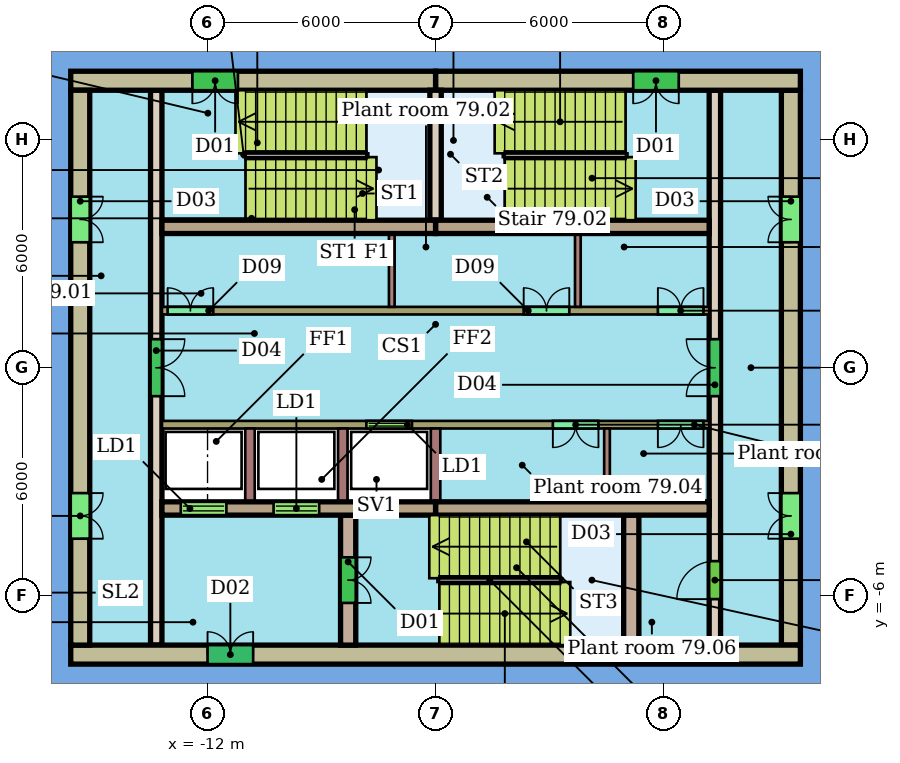
"""IFC4 building model, lengths in metres.
Left out: names, types, materials, properties, quantities, classifications, styles, units other than length and angle.
Written with IfcOpenShell. Run it as: python <this file> out.ifc"""

import sys

from ifc_helpers import new_model, si_unit, direction, frame, frame_2d, origin, place, context, subcontext, project, spatial, rectangle, extrude, element, fill, save


model = new_model("IFC4")
c1 = context("Model", 3, precision=1e-05, world=origin(), true_north=direction((0.0, 1.0)))
c2 = subcontext(c1, "Body", "Model", "MODEL_VIEW")
j1 = project(units=[si_unit("LENGTHUNIT", "METRE"), si_unit("PLANEANGLEUNIT", "RADIAN")], contexts=[c1])
p1 = place(None, origin())
s1 = spatial("IfcSite", under=j1, at=p1, CompositionType="ELEMENT")
p2 = place(p1, origin())
s2 = spatial("IfcBuilding", under=s1, at=p2, CompositionType="ELEMENT")
p3 = place(p2, frame((0.0, 0.0, 317.1)))
s3 = spatial("IfcBuildingStorey", under=s2, at=p3, CompositionType="ELEMENT", Elevation=317.1)
p4 = place(p3, frame((3.6, 7.55, 0.0), z_axis=(0.0, 0.0, 1.0), x_axis=(-1.0, 0.0, 0.0)))
e1 = element("IfcWall", 1, at=p4, inside=s3, PredefinedType="SHEAR", context=c2, shape_type="SweptSolid", body=[
    extrude(rectangle(XDim=9.6, YDim=0.5, at=frame_2d((4.8, 0.0))), origin(), (0.0, 0.0, 1.0), 3.9),
])
p5 = place(p4, frame((3.2, 0.0, 0.0)))
e2 = element("IfcOpeningElement", 2, at=p5, cuts=e1, PredefinedType="OPENING", context=c2, shape_type="SweptSolid", body=[
    extrude(rectangle(XDim=1.2, YDim=2.1, at=frame_2d((0.6, 1.05))), frame((0.0, 0.26, 0.0), z_axis=(0.0, -1.0, 0.0), x_axis=(1.0, 0.0, 0.0)), (0.0, 0.0, 1.0), 0.52),
])
p6 = place(p3, frame((-6.0, 7.55, 0.0), z_axis=(0.0, 0.0, 1.0), x_axis=(-1.0, 0.0, 0.0)))
e3 = element("IfcWall", 3, at=p6, inside=s3, PredefinedType="SHEAR", context=c2, shape_type="SweptSolid", body=[
    extrude(rectangle(XDim=9.6, YDim=0.5, at=frame_2d((4.8, 0.0))), origin(), (0.0, 0.0, 1.0), 3.9),
])
p7 = place(p6, frame((5.2, 0.0, 0.0)))
e4 = element("IfcOpeningElement", 4, at=p7, cuts=e3, PredefinedType="OPENING", context=c2, shape_type="SweptSolid", body=[
    extrude(rectangle(XDim=1.2, YDim=2.1, at=frame_2d((0.6, 1.05))), frame((0.0, 0.26, 0.0), z_axis=(0.0, -1.0, 0.0), x_axis=(1.0, 0.0, 0.0)), (0.0, 0.0, 1.0), 0.52),
])
p8 = place(p3, frame((-15.6, -7.55, 0.0), z_axis=(0.0, 0.0, 1.0), x_axis=(1.0, 0.0, 0.0)))
e5 = element("IfcWall", 5, at=p8, inside=s3, PredefinedType="SHEAR", context=c2, shape_type="SweptSolid", body=[
    extrude(rectangle(XDim=19.2, YDim=0.5, at=frame_2d((9.6, 0.0))), origin(), (0.0, 0.0, 1.0), 3.9),
])
p9 = place(p8, frame((3.6, 0.0, 0.0)))
e6 = element("IfcOpeningElement", 6, at=p9, cuts=e5, PredefinedType="OPENING", context=c2, shape_type="SweptSolid", body=[
    extrude(rectangle(XDim=1.2, YDim=2.1, at=frame_2d((0.6, 1.05))), frame((0.0, 0.26, 0.0), z_axis=(0.0, -1.0, 0.0), x_axis=(1.0, 0.0, 0.0)), (0.0, 0.0, 1.0), 0.52),
])
p10 = place(p3, frame((-15.35, 7.3, 0.0), z_axis=(0.0, 0.0, 1.0), x_axis=(0.0, -1.0, 0.0)))
e7 = element("IfcWall", 7, at=p10, inside=s3, PredefinedType="SHEAR", context=c2, shape_type="SweptSolid", body=[
    extrude(rectangle(XDim=14.6, YDim=0.5, at=frame_2d((7.3, 0.0))), origin(), (0.0, 0.0, 1.0), 3.9),
])
p11 = place(p10, frame((10.6, 0.0, 0.0)))
e8 = element("IfcOpeningElement", 8, at=p11, cuts=e7, PredefinedType="OPENING", context=c2, shape_type="SweptSolid", body=[
    extrude(rectangle(XDim=1.2, YDim=2.1, at=frame_2d((0.6, 1.05))), frame((0.0, 0.26, 0.0), z_axis=(0.0, -1.0, 0.0), x_axis=(1.0, 0.0, 0.0)), (0.0, 0.0, 1.0), 0.52),
])
p12 = place(p10, frame((2.8, 0.0, 0.0)))
e9 = element("IfcOpeningElement", 9, at=p12, cuts=e7, PredefinedType="OPENING", context=c2, shape_type="SweptSolid", body=[
    extrude(rectangle(XDim=1.2, YDim=2.1, at=frame_2d((0.6, 1.05))), frame((0.0, 0.26, 0.0), z_axis=(0.0, -1.0, 0.0), x_axis=(1.0, 0.0, 0.0)), (0.0, 0.0, 1.0), 0.52),
])
p13 = place(p3, frame((3.35, -7.3, 0.0), z_axis=(0.0, 0.0, 1.0), x_axis=(0.0, 1.0, 0.0)))
e10 = element("IfcWall", 10, at=p13, inside=s3, PredefinedType="SHEAR", context=c2, shape_type="SweptSolid", body=[
    extrude(rectangle(XDim=14.6, YDim=0.5, at=frame_2d((7.3, 0.0))), origin(), (0.0, 0.0, 1.0), 3.9),
])
p14 = place(p13, frame((2.8, 0.0, 0.0)))
e11 = element("IfcOpeningElement", 11, at=p14, cuts=e10, PredefinedType="OPENING", context=c2, shape_type="SweptSolid", body=[
    extrude(rectangle(XDim=1.2, YDim=2.1, at=frame_2d((0.6, 1.05))), frame((0.0, 0.26, 0.0), z_axis=(0.0, -1.0, 0.0), x_axis=(1.0, 0.0, 0.0)), (0.0, 0.0, 1.0), 0.52),
])
p15 = place(p13, frame((10.6, 0.0, 0.0)))
e12 = element("IfcOpeningElement", 12, at=p15, cuts=e10, PredefinedType="OPENING", context=c2, shape_type="SweptSolid", body=[
    extrude(rectangle(XDim=1.2, YDim=2.1, at=frame_2d((0.6, 1.05))), frame((0.0, 0.26, 0.0), z_axis=(0.0, -1.0, 0.0), x_axis=(1.0, 0.0, 0.0)), (0.0, 0.0, 1.0), 0.52),
])
for number, where, z_axis, x_axis in (
    (13, (-13.2, 3.705, 0.0), (0.0, 0.0, 1.0), (1.0, 0.0, 0.0)),
    (14, (-6.0, 3.705, 0.0), (0.0, 0.0, 1.0), (1.0, 0.0, 0.0)),
):
    element("IfcWall", number, at=place(p3, frame(where, z_axis=z_axis, x_axis=x_axis)), inside=s3, PredefinedType="SHEAR", context=c2, shape_type="SweptSolid", body=[
        extrude(rectangle(XDim=7.2, YDim=0.35, at=frame_2d((3.6, 0.0))), origin(), (0.0, 0.0, 1.0), 3.9),
    ])
p16 = place(p3, frame((-13.2, -3.705, 0.0), z_axis=(0.0, 0.0, 1.0), x_axis=(1.0, 0.0, 0.0)))
e15 = element("IfcWall", 15, at=p16, inside=s3, PredefinedType="SHEAR", context=c2, shape_type="SweptSolid", body=[
    extrude(rectangle(XDim=7.2, YDim=0.35, at=frame_2d((3.6, 0.0))), origin(), (0.0, 0.0, 1.0), 3.9),
])
p17 = place(p16, frame((0.496, 0.0, 0.0)))
e16 = element("IfcOpeningElement", 16, at=p17, cuts=e15, PredefinedType="OPENING", context=c2, shape_type="SweptSolid", body=[
    extrude(rectangle(XDim=1.2, YDim=2.1, at=frame_2d((0.6, 1.05))), frame((0.0, 0.185, 0.0), z_axis=(0.0, -1.0, 0.0), x_axis=(1.0, 0.0, 0.0)), (0.0, 0.0, 1.0), 0.37),
])
p18 = place(p16, frame((2.938, 0.0, 0.0)))
e17 = element("IfcOpeningElement", 17, at=p18, cuts=e15, PredefinedType="OPENING", context=c2, shape_type="SweptSolid", body=[
    extrude(rectangle(XDim=1.2, YDim=2.1, at=frame_2d((0.6, 1.05))), frame((0.0, 0.185, 0.0), z_axis=(0.0, -1.0, 0.0), x_axis=(1.0, 0.0, 0.0)), (0.0, 0.0, 1.0), 0.37),
])
p19 = place(p3, frame((-6.0, -3.705, 0.0), z_axis=(0.0, 0.0, 1.0), x_axis=(1.0, 0.0, 0.0)))
e18 = element("IfcWall", 18, at=p19, inside=s3, PredefinedType="SHEAR", context=c2, shape_type="SweptSolid", body=[
    extrude(rectangle(XDim=7.2, YDim=0.35, at=frame_2d((3.6, 0.0))), origin(), (0.0, 0.0, 1.0), 3.9),
])
p20 = place(p3, frame((-13.35, 7.3, 0.0), z_axis=(0.0, 0.0, 1.0), x_axis=(0.0, -1.0, 0.0)))
e19 = element("IfcWall", 19, at=p20, inside=s3, PredefinedType="SHEAR", context=c2, shape_type="SweptSolid", body=[
    extrude(rectangle(XDim=14.6, YDim=0.3, at=frame_2d((7.3, 0.0))), origin(), (0.0, 0.0, 1.0), 3.9),
])
p21 = place(p20, frame((6.55, 0.0, 0.0)))
e20 = element("IfcOpeningElement", 20, at=p21, cuts=e19, PredefinedType="OPENING", context=c2, shape_type="SweptSolid", body=[
    extrude(rectangle(XDim=1.5, YDim=2.1, at=frame_2d((0.75, 1.05))), frame((0.0, 0.16, 0.0), z_axis=(0.0, -1.0, 0.0), x_axis=(1.0, 0.0, 0.0)), (0.0, 0.0, 1.0), 0.32),
])
p22 = place(p3, frame((1.35, -7.3, 0.0), z_axis=(0.0, 0.0, 1.0), x_axis=(0.0, 1.0, 0.0)))
e21 = element("IfcWall", 21, at=p22, inside=s3, PredefinedType="SHEAR", context=c2, shape_type="SweptSolid", body=[
    extrude(rectangle(XDim=14.6, YDim=0.3, at=frame_2d((7.3, 0.0))), origin(), (0.0, 0.0, 1.0), 3.9),
])
p23 = place(p22, frame((1.21, 0.0, 0.0)))
e22 = element("IfcOpeningElement", 22, at=p23, cuts=e21, PredefinedType="OPENING", context=c2, shape_type="SweptSolid", body=[
    extrude(rectangle(XDim=1.0, YDim=2.1, at=frame_2d((0.5, 1.05))), frame((0.0, 0.16, 0.0), z_axis=(0.0, -1.0, 0.0), x_axis=(1.0, 0.0, 0.0)), (0.0, 0.0, 1.0), 0.32),
])
p24 = place(p22, frame((6.55, 0.0, 0.0)))
e23 = element("IfcOpeningElement", 23, at=p24, cuts=e21, PredefinedType="OPENING", context=c2, shape_type="SweptSolid", body=[
    extrude(rectangle(XDim=1.5, YDim=2.1, at=frame_2d((0.75, 1.05))), frame((0.0, 0.16, 0.0), z_axis=(0.0, -1.0, 0.0), x_axis=(1.0, 0.0, 0.0)), (0.0, 0.0, 1.0), 0.32),
])
p25 = place(p3, frame((-13.2, 1.5, 0.0), z_axis=(0.0, 0.0, 1.0), x_axis=(1.0, 0.0, 0.0)))
e24 = element("IfcWall", 24, at=p25, inside=s3, PredefinedType="SHEAR", context=c2, shape_type="SweptSolid", body=[
    extrude(rectangle(XDim=14.4, YDim=0.2, at=frame_2d((7.2, 0.0))), origin(), (0.0, 0.0, 1.0), 3.9),
])
p26 = place(p25, frame((0.15, 0.0, 0.0)))
e25 = element("IfcOpeningElement", 25, at=p26, cuts=e24, PredefinedType="OPENING", context=c2, shape_type="SweptSolid", body=[
    extrude(rectangle(XDim=1.2, YDim=2.4, at=frame_2d((0.6, 1.2))), frame((0.0, 0.11, 0.0), z_axis=(0.0, -1.0, 0.0), x_axis=(1.0, 0.0, 0.0)), (0.0, 0.0, 1.0), 0.22),
])
p27 = place(p25, frame((9.519, 0.0, 0.0)))
e26 = element("IfcOpeningElement", 26, at=p27, cuts=e24, PredefinedType="OPENING", context=c2, shape_type="SweptSolid", body=[
    extrude(rectangle(XDim=1.2, YDim=2.4, at=frame_2d((0.6, 1.2))), frame((0.0, 0.11, 0.0), z_axis=(0.0, -1.0, 0.0), x_axis=(1.0, 0.0, 0.0)), (0.0, 0.0, 1.0), 0.22),
])
p28 = place(p25, frame((13.05, 0.0, 0.0)))
e27 = element("IfcOpeningElement", 27, at=p28, cuts=e24, PredefinedType="OPENING", context=c2, shape_type="SweptSolid", body=[
    extrude(rectangle(XDim=1.2, YDim=2.4, at=frame_2d((0.6, 1.2))), frame((0.0, 0.11, 0.0), z_axis=(0.0, -1.0, 0.0), x_axis=(1.0, 0.0, 0.0)), (0.0, 0.0, 1.0), 0.22),
])
p29 = place(p3, frame((1.2, -1.5, 0.0), z_axis=(0.0, 0.0, 1.0), x_axis=(-1.0, 0.0, 0.0)))
e28 = element("IfcWall", 28, at=p29, inside=s3, PredefinedType="SHEAR", context=c2, shape_type="SweptSolid", body=[
    extrude(rectangle(XDim=14.4, YDim=0.2, at=frame_2d((7.2, 0.0))), origin(), (0.0, 0.0, 1.0), 3.9),
])
p30 = place(p29, frame((7.821, 0.0, 0.0)))
e29 = element("IfcOpeningElement", 29, at=p30, cuts=e28, PredefinedType="OPENING", context=c2, shape_type="SweptSolid", body=[
    extrude(rectangle(XDim=1.2, YDim=2.1, at=frame_2d((0.6, 1.05))), frame((0.0, 0.11, 0.0), z_axis=(0.0, -1.0, 0.0), x_axis=(1.0, 0.0, 0.0)), (0.0, 0.0, 1.0), 0.22),
])
p31 = place(p29, frame((2.914, 0.0, 0.0)))
e30 = element("IfcOpeningElement", 30, at=p31, cuts=e28, PredefinedType="OPENING", context=c2, shape_type="SweptSolid", body=[
    extrude(rectangle(XDim=1.2, YDim=2.4, at=frame_2d((0.6, 1.2))), frame((0.0, 0.11, 0.0), z_axis=(0.0, -1.0, 0.0), x_axis=(1.0, 0.0, 0.0)), (0.0, 0.0, 1.0), 0.22),
])
p32 = place(p29, frame((0.15, 0.0, 0.0)))
e31 = element("IfcOpeningElement", 31, at=p32, cuts=e28, PredefinedType="OPENING", context=c2, shape_type="SweptSolid", body=[
    extrude(rectangle(XDim=1.2, YDim=2.4, at=frame_2d((0.6, 1.2))), frame((0.0, 0.11, 0.0), z_axis=(0.0, -1.0, 0.0), x_axis=(1.0, 0.0, 0.0)), (0.0, 0.0, 1.0), 0.22),
])
p33 = place(p3, frame((-8.3, -3.88, 0.0), z_axis=(0.0, 0.0, 1.0), x_axis=(0.0, -1.0, 0.0)))
e32 = element("IfcWall", 32, at=p33, inside=s3, PredefinedType="SHEAR", context=c2, shape_type="SweptSolid", body=[
    extrude(rectangle(XDim=3.42, YDim=0.4, at=frame_2d((1.71, 0.0))), origin(), (0.0, 0.0, 1.0), 3.9),
])
p34 = place(p33, frame((1.11, 0.0, 0.0)))
e33 = element("IfcOpeningElement", 33, at=p34, cuts=e32, PredefinedType="OPENING", context=c2, shape_type="SweptSolid", body=[
    extrude(rectangle(XDim=1.2, YDim=2.1, at=frame_2d((0.6, 1.05))), frame((0.0, 0.21, 0.0), z_axis=(0.0, -1.0, 0.0), x_axis=(1.0, 0.0, 0.0)), (0.0, 0.0, 1.0), 0.42),
])
p35 = place(p3, frame((-0.85, -3.88, 0.0), z_axis=(0.0, 0.0, 1.0), x_axis=(0.0, -1.0, 0.0)))
e34 = element("IfcWall", 34, at=p35, inside=s3, PredefinedType="SHEAR", context=c2, shape_type="SweptSolid", body=[
    extrude(rectangle(XDim=3.42, YDim=0.4, at=frame_2d((1.71, 0.0))), origin(), (0.0, 0.0, 1.0), 3.9),
])
p36 = place(p3, frame((-6.0, 3.88, 0.0), z_axis=(0.0, 0.0, 1.0), x_axis=(0.0, 1.0, 0.0)))
e35 = element("IfcWall", 35, at=p36, inside=s3, PredefinedType="SHEAR", context=c2, shape_type="SweptSolid", body=[
    extrude(rectangle(XDim=3.42, YDim=0.3, at=frame_2d((1.71, 0.0))), origin(), (0.0, 0.0, 1.0), 3.9),
])
for number, where, z_axis, x_axis in (
    (36, (-7.152, 1.6, 0.0), (0.0, 0.0, 1.0), (0.0, 1.0, 0.0)),
    (37, (-2.256, 1.6, 0.0), (0.0, 0.0, 1.0), (0.0, 1.0, 0.0)),
):
    element("IfcWall", number, at=place(p3, frame(where, z_axis=z_axis, x_axis=x_axis)), inside=s3, PredefinedType="PARTITIONING", context=c2, shape_type="SweptSolid", body=[
        extrude(rectangle(XDim=1.93, YDim=0.15, at=frame_2d((0.965, 0.0))), origin(), (0.0, 0.0, 1.0), 3.9),
    ])
for number, where, z_axis, x_axis in (
    (38, (-10.883, -1.6, 0.0), (0.0, 0.0, 1.0), (0.0, -1.0, 0.0)),
    (39, (-8.442, -1.6, 0.0), (0.0, 0.0, 1.0), (0.0, -1.0, 0.0)),
    (40, (-6.0, -1.6, 0.0), (0.0, 0.0, 1.0), (0.0, -1.0, 0.0)),
):
    element("IfcWall", number, at=place(p3, frame(where, z_axis=z_axis, x_axis=x_axis)), inside=s3, PredefinedType="SHEAR", context=c2, shape_type="SweptSolid", body=[
        extrude(rectangle(XDim=1.93, YDim=0.25, at=frame_2d((0.965, 0.0))), origin(), (0.0, 0.0, 1.0), 3.9),
    ])
p37 = place(p3, frame((-1.489, -1.6, 0.0), z_axis=(0.0, 0.0, 1.0), x_axis=(0.0, -1.0, 0.0)))
e41 = element("IfcWall", 41, at=p37, inside=s3, PredefinedType="PARTITIONING", context=c2, shape_type="SweptSolid", body=[
    extrude(rectangle(XDim=1.93, YDim=0.15, at=frame_2d((0.965, 0.0))), origin(), (0.0, 0.0, 1.0), 3.9),
])
p38 = place(p5, origin())
e42 = element("IfcDoor", 42, at=p38, inside=s3, OperationType="DOUBLE_DOOR_SINGLE_SWING", PredefinedType="NOTDEFINED", context=c2, shape_type="SweptSolid", body=[
    extrude(rectangle(XDim=1.2, YDim=2.1, at=frame_2d((0.6, 1.05))), frame((0.0, 0.025, 0.0), z_axis=(0.0, -1.0, 0.0), x_axis=(1.0, 0.0, 0.0)), (0.0, 0.0, 1.0), 0.05),
])
fill(e2, e42)
p39 = place(p7, origin())
e43 = element("IfcDoor", 43, at=p39, inside=s3, OperationType="DOUBLE_DOOR_SINGLE_SWING", PredefinedType="NOTDEFINED", context=c2, shape_type="SweptSolid", body=[
    extrude(rectangle(XDim=1.2, YDim=2.1, at=frame_2d((0.6, 1.05))), frame((0.0, 0.025, 0.0), z_axis=(0.0, -1.0, 0.0), x_axis=(1.0, 0.0, 0.0)), (0.0, 0.0, 1.0), 0.05),
])
fill(e4, e43)
p40 = place(p9, origin())
e44 = element("IfcDoor", 44, at=p40, inside=s3, OperationType="DOUBLE_DOOR_SINGLE_SWING", PredefinedType="NOTDEFINED", context=c2, shape_type="SweptSolid", body=[
    extrude(rectangle(XDim=1.2, YDim=2.1, at=frame_2d((0.6, 1.05))), frame((0.0, 0.025, 0.0), z_axis=(0.0, -1.0, 0.0), x_axis=(1.0, 0.0, 0.0)), (0.0, 0.0, 1.0), 0.05),
])
fill(e6, e44)
p41 = place(p11, origin())
e45 = element("IfcDoor", 45, at=p41, inside=s3, OperationType="DOUBLE_DOOR_SINGLE_SWING", PredefinedType="NOTDEFINED", context=c2, shape_type="SweptSolid", body=[
    extrude(rectangle(XDim=1.2, YDim=2.1, at=frame_2d((0.6, 1.05))), frame((0.0, 0.025, 0.0), z_axis=(0.0, -1.0, 0.0), x_axis=(1.0, 0.0, 0.0)), (0.0, 0.0, 1.0), 0.05),
])
fill(e8, e45)
p42 = place(p12, origin())
e46 = element("IfcDoor", 46, at=p42, inside=s3, OperationType="DOUBLE_DOOR_SINGLE_SWING", PredefinedType="NOTDEFINED", context=c2, shape_type="SweptSolid", body=[
    extrude(rectangle(XDim=1.2, YDim=2.1, at=frame_2d((0.6, 1.05))), frame((0.0, 0.025, 0.0), z_axis=(0.0, -1.0, 0.0), x_axis=(1.0, 0.0, 0.0)), (0.0, 0.0, 1.0), 0.05),
])
fill(e9, e46)
p43 = place(p14, origin())
e47 = element("IfcDoor", 47, at=p43, inside=s3, OperationType="DOUBLE_DOOR_SINGLE_SWING", PredefinedType="NOTDEFINED", context=c2, shape_type="SweptSolid", body=[
    extrude(rectangle(XDim=1.2, YDim=2.1, at=frame_2d((0.6, 1.05))), frame((0.0, 0.025, 0.0), z_axis=(0.0, -1.0, 0.0), x_axis=(1.0, 0.0, 0.0)), (0.0, 0.0, 1.0), 0.05),
])
fill(e11, e47)
p44 = place(p15, origin())
e48 = element("IfcDoor", 48, at=p44, inside=s3, OperationType="DOUBLE_DOOR_SINGLE_SWING", PredefinedType="NOTDEFINED", context=c2, shape_type="SweptSolid", body=[
    extrude(rectangle(XDim=1.2, YDim=2.1, at=frame_2d((0.6, 1.05))), frame((0.0, 0.025, 0.0), z_axis=(0.0, -1.0, 0.0), x_axis=(1.0, 0.0, 0.0)), (0.0, 0.0, 1.0), 0.05),
])
fill(e12, e48)
p45 = place(p17, origin())
e49 = element("IfcDoor", 49, at=p45, inside=s3, OperationType="DOUBLE_DOOR_SLIDING", PredefinedType="NOTDEFINED", context=c2, shape_type="SweptSolid", body=[
    extrude(rectangle(XDim=1.2, YDim=2.1, at=frame_2d((0.6, 1.05))), frame((0.0, 0.025, 0.0), z_axis=(0.0, -1.0, 0.0), x_axis=(1.0, 0.0, 0.0)), (0.0, 0.0, 1.0), 0.05),
])
fill(e16, e49)
p46 = place(p18, origin())
e50 = element("IfcDoor", 50, at=p46, inside=s3, OperationType="DOUBLE_DOOR_SLIDING", PredefinedType="NOTDEFINED", context=c2, shape_type="SweptSolid", body=[
    extrude(rectangle(XDim=1.2, YDim=2.1, at=frame_2d((0.6, 1.05))), frame((0.0, 0.025, 0.0), z_axis=(0.0, -1.0, 0.0), x_axis=(1.0, 0.0, 0.0)), (0.0, 0.0, 1.0), 0.05),
])
fill(e17, e50)
p47 = place(p21, origin())
e51 = element("IfcDoor", 51, at=p47, inside=s3, OperationType="DOUBLE_DOOR_SINGLE_SWING", PredefinedType="NOTDEFINED", context=c2, shape_type="SweptSolid", body=[
    extrude(rectangle(XDim=1.5, YDim=2.1, at=frame_2d((0.75, 1.05))), frame((0.0, 0.025, 0.0), z_axis=(0.0, -1.0, 0.0), x_axis=(1.0, 0.0, 0.0)), (0.0, 0.0, 1.0), 0.05),
])
fill(e20, e51)
p48 = place(p23, origin())
e52 = element("IfcDoor", 52, at=p48, inside=s3, OperationType="SINGLE_SWING_LEFT", PredefinedType="NOTDEFINED", context=c2, shape_type="SweptSolid", body=[
    extrude(rectangle(XDim=1.0, YDim=2.1, at=frame_2d((0.5, 1.05))), frame((0.0, 0.025, 0.0), z_axis=(0.0, -1.0, 0.0), x_axis=(1.0, 0.0, 0.0)), (0.0, 0.0, 1.0), 0.05),
])
fill(e22, e52)
p49 = place(p24, origin())
e53 = element("IfcDoor", 53, at=p49, inside=s3, OperationType="DOUBLE_DOOR_SINGLE_SWING", PredefinedType="NOTDEFINED", context=c2, shape_type="SweptSolid", body=[
    extrude(rectangle(XDim=1.5, YDim=2.1, at=frame_2d((0.75, 1.05))), frame((0.0, 0.025, 0.0), z_axis=(0.0, -1.0, 0.0), x_axis=(1.0, 0.0, 0.0)), (0.0, 0.0, 1.0), 0.05),
])
fill(e23, e53)
p50 = place(p26, origin())
e54 = element("IfcDoor", 54, at=p50, inside=s3, OperationType="DOUBLE_DOOR_SINGLE_SWING", PredefinedType="NOTDEFINED", context=c2, shape_type="SweptSolid", body=[
    extrude(rectangle(XDim=1.2, YDim=2.4, at=frame_2d((0.6, 1.2))), frame((0.0, 0.025, 0.0), z_axis=(0.0, -1.0, 0.0), x_axis=(1.0, 0.0, 0.0)), (0.0, 0.0, 1.0), 0.05),
])
fill(e25, e54)
p51 = place(p27, origin())
e55 = element("IfcDoor", 55, at=p51, inside=s3, OperationType="DOUBLE_DOOR_SINGLE_SWING", PredefinedType="NOTDEFINED", context=c2, shape_type="SweptSolid", body=[
    extrude(rectangle(XDim=1.2, YDim=2.4, at=frame_2d((0.6, 1.2))), frame((0.0, 0.025, 0.0), z_axis=(0.0, -1.0, 0.0), x_axis=(1.0, 0.0, 0.0)), (0.0, 0.0, 1.0), 0.05),
])
fill(e26, e55)
p52 = place(p28, origin())
e56 = element("IfcDoor", 56, at=p52, inside=s3, OperationType="DOUBLE_DOOR_SINGLE_SWING", PredefinedType="NOTDEFINED", context=c2, shape_type="SweptSolid", body=[
    extrude(rectangle(XDim=1.2, YDim=2.4, at=frame_2d((0.6, 1.2))), frame((0.0, 0.025, 0.0), z_axis=(0.0, -1.0, 0.0), x_axis=(1.0, 0.0, 0.0)), (0.0, 0.0, 1.0), 0.05),
])
fill(e27, e56)
p53 = place(p30, origin())
e57 = element("IfcDoor", 57, at=p53, inside=s3, OperationType="DOUBLE_DOOR_SLIDING", PredefinedType="NOTDEFINED", context=c2, shape_type="SweptSolid", body=[
    extrude(rectangle(XDim=1.2, YDim=2.1, at=frame_2d((0.6, 1.05))), frame((0.0, 0.025, 0.0), z_axis=(0.0, -1.0, 0.0), x_axis=(1.0, 0.0, 0.0)), (0.0, 0.0, 1.0), 0.05),
])
fill(e29, e57)
p54 = place(p31, origin())
e58 = element("IfcDoor", 58, at=p54, inside=s3, OperationType="DOUBLE_DOOR_SINGLE_SWING", PredefinedType="NOTDEFINED", context=c2, shape_type="SweptSolid", body=[
    extrude(rectangle(XDim=1.2, YDim=2.4, at=frame_2d((0.6, 1.2))), frame((0.0, 0.025, 0.0), z_axis=(0.0, -1.0, 0.0), x_axis=(1.0, 0.0, 0.0)), (0.0, 0.0, 1.0), 0.05),
])
fill(e30, e58)
p55 = place(p32, origin())
e59 = element("IfcDoor", 59, at=p55, inside=s3, OperationType="DOUBLE_DOOR_SINGLE_SWING", PredefinedType="NOTDEFINED", context=c2, shape_type="SweptSolid", body=[
    extrude(rectangle(XDim=1.2, YDim=2.4, at=frame_2d((0.6, 1.2))), frame((0.0, 0.025, 0.0), z_axis=(0.0, -1.0, 0.0), x_axis=(1.0, 0.0, 0.0)), (0.0, 0.0, 1.0), 0.05),
])
fill(e31, e59)
p56 = place(p34, origin())
e60 = element("IfcDoor", 60, at=p56, inside=s3, OperationType="DOUBLE_DOOR_SINGLE_SWING", PredefinedType="NOTDEFINED", context=c2, shape_type="SweptSolid", body=[
    extrude(rectangle(XDim=1.2, YDim=2.1, at=frame_2d((0.6, 1.05))), frame((0.0, 0.025, 0.0), z_axis=(0.0, -1.0, 0.0), x_axis=(1.0, 0.0, 0.0)), (0.0, 0.0, 1.0), 0.05),
])
fill(e33, e60)
save(model, sys.argv[1])
